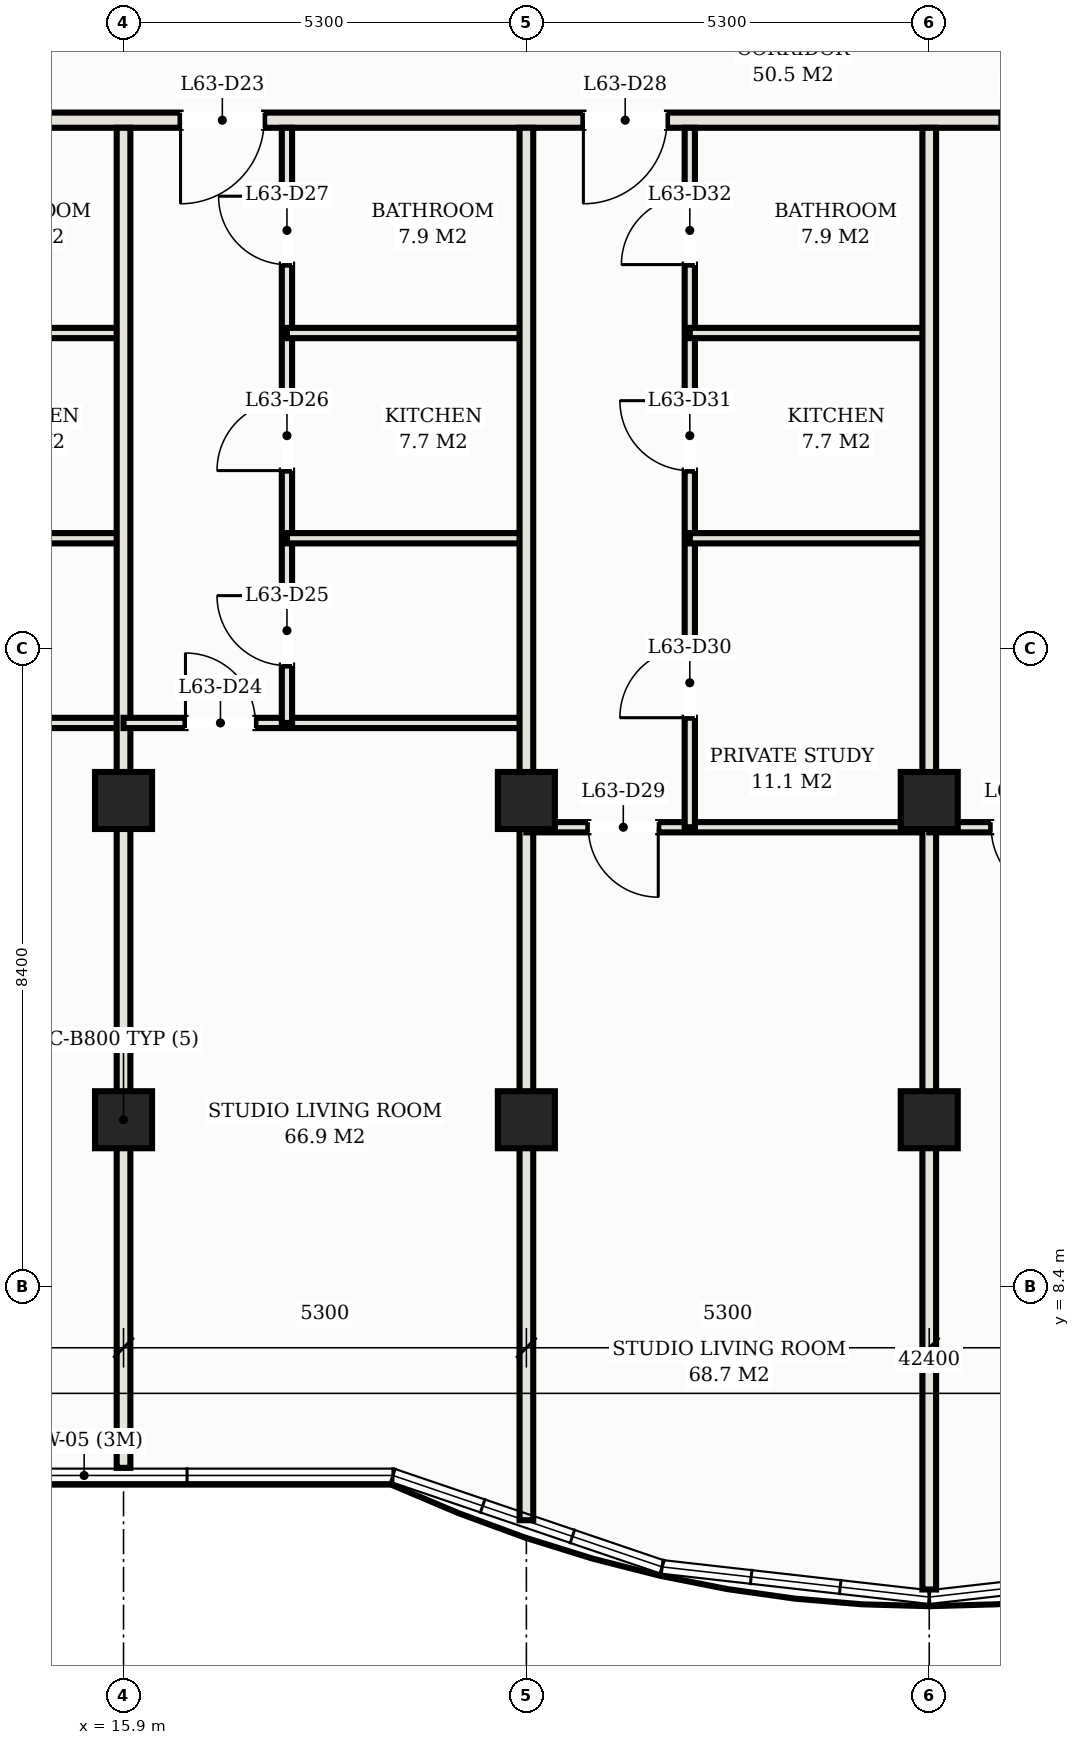
"""IFC4 building model, lengths in metres.
Left out: names, types, materials, properties, quantities, classifications, styles, units other than length and angle.
Written with IfcOpenShell. Run it as: python <this file> out.ifc"""

import sys

from ifc_helpers import new_model, si_unit, direction, frame, frame_2d, origin, origin_2d, place, context, subcontext, project, spatial, rectangle, hollow_rectangle, extrude, element, fill, save


model = new_model("IFC4")
c1 = context("Model", 3, precision=1e-05, world=origin(), true_north=direction((0.0, 1.0)))
c2 = subcontext(c1, "Body", "Model", "MODEL_VIEW")
j1 = project(units=[si_unit("LENGTHUNIT", "METRE"), si_unit("PLANEANGLEUNIT", "RADIAN")], contexts=[c1])
p1 = place(None, origin())
s1 = spatial("IfcSite", under=j1, at=p1, CompositionType="ELEMENT")
p2 = place(p1, origin())
s2 = spatial("IfcBuilding", under=s1, at=p2, CompositionType="ELEMENT")
p3 = place(p2, frame((0.0, 0.0, 229.7)))
s3 = spatial("IfcBuildingStorey", under=s2, at=p3, CompositionType="ELEMENT", Elevation=229.7)
for number, where, z_axis, x_axis in (
    (1, (15.9, 14.8, 0.0), (0.0, 0.0, 1.0), (1.0, 0.0, 0.0)),
    (2, (15.9, 10.6, 0.0), (0.0, 0.0, 1.0), (1.0, 0.0, 0.0)),
    (3, (21.2, 14.8, 0.0), (0.0, 0.0, 1.0), (1.0, 0.0, 0.0)),
    (4, (21.2, 10.6, 0.0), (0.0, 0.0, 1.0), (1.0, 0.0, 0.0)),
    (5, (26.5, 14.8, 0.0), (0.0, 0.0, 1.0), (1.0, 0.0, 0.0)),
    (6, (26.5, 10.6, 0.0), (0.0, 0.0, 1.0), (1.0, 0.0, 0.0)),
):
    element("IfcColumn", number, at=place(p3, frame(where, z_axis=z_axis, x_axis=x_axis)), inside=s3, PredefinedType="COLUMN", context=c2, shape_type="SweptSolid", body=[
        extrude(hollow_rectangle(XDim=0.75, YDim=0.75, WallThickness=0.025, at=origin_2d()), origin(), (0.0, 0.0, 1.0), 3.3),
    ])
p4 = place(p3, frame((6.72, 23.75, 0.0), z_axis=(0.0, 0.0, 1.0), x_axis=(1.0, 0.0, 0.0)))
e7 = element("IfcWall", 7, at=p4, inside=s3, PredefinedType="PARTITIONING", context=c2, shape_type="SweptSolid", body=[
    extrude(rectangle(XDim=39.56, YDim=0.2, at=frame_2d((19.78, 0.0))), origin(), (0.0, 0.0, 1.0), 2.43),
])
p5 = place(p4, frame((4.63, 0.0, 0.0)))
e8 = element("IfcOpeningElement", 8, at=p5, cuts=e7, PredefinedType="OPENING", context=c2, shape_type="SweptSolid", body=[
    extrude(rectangle(XDim=1.1, YDim=2.25, at=frame_2d((0.55, 1.125))), frame((0.0, 0.11, 0.0), z_axis=(0.0, -1.0, 0.0), x_axis=(1.0, 0.0, 0.0)), (0.0, 0.0, 1.0), 0.22),
])
p6 = place(p4, frame((9.93, 0.0, 0.0)))
e9 = element("IfcOpeningElement", 9, at=p6, cuts=e7, PredefinedType="OPENING", context=c2, shape_type="SweptSolid", body=[
    extrude(rectangle(XDim=1.1, YDim=2.25, at=frame_2d((0.55, 1.125))), frame((0.0, 0.11, 0.0), z_axis=(0.0, -1.0, 0.0), x_axis=(1.0, 0.0, 0.0)), (0.0, 0.0, 1.0), 0.22),
])
p7 = place(p4, frame((15.23, 0.0, 0.0)))
e10 = element("IfcOpeningElement", 10, at=p7, cuts=e7, PredefinedType="OPENING", context=c2, shape_type="SweptSolid", body=[
    extrude(rectangle(XDim=1.1, YDim=2.25, at=frame_2d((0.55, 1.125))), frame((0.0, 0.11, 0.0), z_axis=(0.0, -1.0, 0.0), x_axis=(1.0, 0.0, 0.0)), (0.0, 0.0, 1.0), 0.22),
])
p8 = place(p4, frame((20.73, 0.0, 0.0)))
e11 = element("IfcOpeningElement", 11, at=p8, cuts=e7, PredefinedType="OPENING", context=c2, shape_type="SweptSolid", body=[
    extrude(rectangle(XDim=1.1, YDim=2.25, at=frame_2d((0.55, 1.125))), frame((0.0, 0.11, 0.0), z_axis=(0.0, -1.0, 0.0), x_axis=(1.0, 0.0, 0.0)), (0.0, 0.0, 1.0), 0.22),
])
p9 = place(p4, frame((25.83, 0.0, 0.0)))
e12 = element("IfcOpeningElement", 12, at=p9, cuts=e7, PredefinedType="OPENING", context=c2, shape_type="SweptSolid", body=[
    extrude(rectangle(XDim=1.1, YDim=2.25, at=frame_2d((0.55, 1.125))), frame((0.0, 0.11, 0.0), z_axis=(0.0, -1.0, 0.0), x_axis=(1.0, 0.0, 0.0)), (0.0, 0.0, 1.0), 0.22),
])
p10 = place(p4, frame((31.13, 0.0, 0.0)))
e13 = element("IfcOpeningElement", 13, at=p10, cuts=e7, PredefinedType="OPENING", context=c2, shape_type="SweptSolid", body=[
    extrude(rectangle(XDim=1.1, YDim=2.25, at=frame_2d((0.55, 1.125))), frame((0.0, 0.11, 0.0), z_axis=(0.0, -1.0, 0.0), x_axis=(1.0, 0.0, 0.0)), (0.0, 0.0, 1.0), 0.22),
])
p11 = place(p4, frame((2.085, 0.0, 0.0)))
e14 = element("IfcOpeningElement", 14, at=p11, cuts=e7, PredefinedType="OPENING", context=c2, shape_type="SweptSolid", body=[
    extrude(rectangle(XDim=0.92, YDim=2.15, at=frame_2d((0.46, 1.075))), frame((0.0, 0.11, 0.0), z_axis=(0.0, -1.0, 0.0), x_axis=(1.0, 0.0, 0.0)), (0.0, 0.0, 1.0), 0.22),
])
p12 = place(p4, frame((36.555, 0.0, 0.0)))
e15 = element("IfcOpeningElement", 15, at=p12, cuts=e7, PredefinedType="OPENING", context=c2, shape_type="SweptSolid", body=[
    extrude(rectangle(XDim=0.92, YDim=2.15, at=frame_2d((0.46, 1.075))), frame((0.0, 0.11, 0.0), z_axis=(0.0, -1.0, 0.0), x_axis=(1.0, 0.0, 0.0)), (0.0, 0.0, 1.0), 0.22),
])
p13 = place(p3, frame((10.6, 15.82, 0.0), z_axis=(0.0, 0.0, 1.0), x_axis=(1.0, 0.0, 0.0)))
e16 = element("IfcWall", 16, at=p13, inside=s3, PredefinedType="PARTITIONING", context=c2, shape_type="SweptSolid", body=[
    extrude(rectangle(XDim=5.3, YDim=0.135, at=frame_2d((2.65, 0.0))), origin(), (0.0, 0.0, 1.0), 2.43),
])
p14 = place(p13, frame((0.815, 0.0, 0.0)))
e17 = element("IfcOpeningElement", 17, at=p14, cuts=e16, PredefinedType="OPENING", context=c2, shape_type="SweptSolid", body=[
    extrude(rectangle(XDim=0.92, YDim=2.15, at=frame_2d((0.46, 1.075))), frame((0.0, 0.078, 0.0), z_axis=(0.0, -1.0, 0.0), x_axis=(1.0, 0.0, 0.0)), (0.0, 0.0, 1.0), 0.155),
])
for number, where, z_axis, x_axis in (
    (18, (12.75, 18.25, 0.0), (0.0, 0.0, 1.0), (1.0, 0.0, 0.0)),
    (19, (12.75, 20.95, 0.0), (0.0, 0.0, 1.0), (1.0, 0.0, 0.0)),
):
    element("IfcWall", number, at=place(p3, frame(where, z_axis=z_axis, x_axis=x_axis)), inside=s3, PredefinedType="PARTITIONING", context=c2, shape_type="SweptSolid", body=[
        extrude(rectangle(XDim=3.15, YDim=0.135, at=frame_2d((1.575, 0.0))), origin(), (0.0, 0.0, 1.0), 2.43),
    ])
p15 = place(p3, frame((15.9, 6.02, 0.0), z_axis=(0.0, 0.0, 1.0), x_axis=(0.0, 1.0, 0.0)))
e20 = element("IfcWall", 20, at=p15, inside=s3, PredefinedType="PARTITIONING", context=c2, shape_type="SweptSolid", body=[
    extrude(rectangle(XDim=17.63, YDim=0.18, at=frame_2d((8.815, 0.0))), origin(), (0.0, 0.0, 1.0), 2.43),
])
p16 = place(p3, frame((15.9, 15.82, 0.0), z_axis=(0.0, 0.0, 1.0), x_axis=(1.0, 0.0, 0.0)))
e21 = element("IfcWall", 21, at=p16, inside=s3, PredefinedType="PARTITIONING", context=c2, shape_type="SweptSolid", body=[
    extrude(rectangle(XDim=5.3, YDim=0.135, at=frame_2d((2.65, 0.0))), origin(), (0.0, 0.0, 1.0), 2.43),
])
p17 = place(p16, frame((0.815, 0.0, 0.0)))
e22 = element("IfcOpeningElement", 22, at=p17, cuts=e21, PredefinedType="OPENING", context=c2, shape_type="SweptSolid", body=[
    extrude(rectangle(XDim=0.92, YDim=2.15, at=frame_2d((0.46, 1.075))), frame((0.0, 0.078, 0.0), z_axis=(0.0, -1.0, 0.0), x_axis=(1.0, 0.0, 0.0)), (0.0, 0.0, 1.0), 0.155),
])
p18 = place(p3, frame((18.05, 15.82, 0.0), z_axis=(0.0, 0.0, 1.0), x_axis=(0.0, 1.0, 0.0)))
e23 = element("IfcWall", 23, at=p18, inside=s3, PredefinedType="PARTITIONING", context=c2, shape_type="SweptSolid", body=[
    extrude(rectangle(XDim=7.83, YDim=0.135, at=frame_2d((3.915, 0.0))), origin(), (0.0, 0.0, 1.0), 2.43),
])
p19 = place(p18, frame((0.755, 0.0, 0.0)))
e24 = element("IfcOpeningElement", 24, at=p19, cuts=e23, PredefinedType="OPENING", context=c2, shape_type="SweptSolid", body=[
    extrude(rectangle(XDim=0.92, YDim=2.15, at=frame_2d((0.46, 1.075))), frame((0.0, 0.078, 0.0), z_axis=(0.0, -1.0, 0.0), x_axis=(1.0, 0.0, 0.0)), (0.0, 0.0, 1.0), 0.155),
])
p20 = place(p18, frame((3.32, 0.0, 0.0)))
e25 = element("IfcOpeningElement", 25, at=p20, cuts=e23, PredefinedType="OPENING", context=c2, shape_type="SweptSolid", body=[
    extrude(rectangle(XDim=0.92, YDim=2.15, at=frame_2d((0.46, 1.075))), frame((0.0, 0.078, 0.0), z_axis=(0.0, -1.0, 0.0), x_axis=(1.0, 0.0, 0.0)), (0.0, 0.0, 1.0), 0.155),
])
p21 = place(p18, frame((6.03, 0.0, 0.0)))
e26 = element("IfcOpeningElement", 26, at=p21, cuts=e23, PredefinedType="OPENING", context=c2, shape_type="SweptSolid", body=[
    extrude(rectangle(XDim=0.9, YDim=2.15, at=frame_2d((0.45, 1.075))), frame((0.0, 0.078, 0.0), z_axis=(0.0, -1.0, 0.0), x_axis=(1.0, 0.0, 0.0)), (0.0, 0.0, 1.0), 0.155),
])
for number, where, z_axis, x_axis in (
    (27, (18.05, 18.25, 0.0), (0.0, 0.0, 1.0), (1.0, 0.0, 0.0)),
    (28, (18.05, 20.95, 0.0), (0.0, 0.0, 1.0), (1.0, 0.0, 0.0)),
):
    element("IfcWall", number, at=place(p3, frame(where, z_axis=z_axis, x_axis=x_axis)), inside=s3, PredefinedType="PARTITIONING", context=c2, shape_type="SweptSolid", body=[
        extrude(rectangle(XDim=3.15, YDim=0.135, at=frame_2d((1.575, 0.0))), origin(), (0.0, 0.0, 1.0), 2.43),
    ])
p22 = place(p3, frame((21.2, 5.331, 0.0), z_axis=(0.0, 0.0, 1.0), x_axis=(0.0, 1.0, 0.0)))
e29 = element("IfcWall", 29, at=p22, inside=s3, PredefinedType="PARTITIONING", context=c2, shape_type="SweptSolid", body=[
    extrude(rectangle(XDim=18.319, YDim=0.18, at=frame_2d((9.159, 0.0))), origin(), (0.0, 0.0, 1.0), 2.43),
])
p23 = place(p3, frame((21.2, 14.448, 0.0), z_axis=(0.0, 0.0, 1.0), x_axis=(1.0, 0.0, 0.0)))
e30 = element("IfcWall", 30, at=p23, inside=s3, PredefinedType="PARTITIONING", context=c2, shape_type="SweptSolid", body=[
    extrude(rectangle(XDim=5.3, YDim=0.135, at=frame_2d((2.65, 0.0))), origin(), (0.0, 0.0, 1.0), 2.43),
])
p24 = place(p23, frame((0.815, 0.0, 0.0)))
e31 = element("IfcOpeningElement", 31, at=p24, cuts=e30, PredefinedType="OPENING", context=c2, shape_type="SweptSolid", body=[
    extrude(rectangle(XDim=0.92, YDim=2.15, at=frame_2d((0.46, 1.075))), frame((0.0, 0.078, 0.0), z_axis=(0.0, -1.0, 0.0), x_axis=(1.0, 0.0, 0.0)), (0.0, 0.0, 1.0), 0.155),
])
p25 = place(p3, frame((23.35, 14.448, 0.0), z_axis=(0.0, 0.0, 1.0), x_axis=(0.0, 1.0, 0.0)))
e32 = element("IfcWall", 32, at=p25, inside=s3, PredefinedType="PARTITIONING", context=c2, shape_type="SweptSolid", body=[
    extrude(rectangle(XDim=9.202, YDim=0.135, at=frame_2d((4.601, 0.0))), origin(), (0.0, 0.0, 1.0), 2.43),
])
p26 = place(p25, frame((1.441, 0.0, 0.0)))
e33 = element("IfcOpeningElement", 33, at=p26, cuts=e32, PredefinedType="OPENING", context=c2, shape_type="SweptSolid", body=[
    extrude(rectangle(XDim=0.92, YDim=2.15, at=frame_2d((0.46, 1.075))), frame((0.0, 0.078, 0.0), z_axis=(0.0, -1.0, 0.0), x_axis=(1.0, 0.0, 0.0)), (0.0, 0.0, 1.0), 0.155),
])
p27 = place(p25, frame((4.692, 0.0, 0.0)))
e34 = element("IfcOpeningElement", 34, at=p27, cuts=e32, PredefinedType="OPENING", context=c2, shape_type="SweptSolid", body=[
    extrude(rectangle(XDim=0.92, YDim=2.15, at=frame_2d((0.46, 1.075))), frame((0.0, 0.078, 0.0), z_axis=(0.0, -1.0, 0.0), x_axis=(1.0, 0.0, 0.0)), (0.0, 0.0, 1.0), 0.155),
])
p28 = place(p25, frame((7.402, 0.0, 0.0)))
e35 = element("IfcOpeningElement", 35, at=p28, cuts=e32, PredefinedType="OPENING", context=c2, shape_type="SweptSolid", body=[
    extrude(rectangle(XDim=0.9, YDim=2.15, at=frame_2d((0.45, 1.075))), frame((0.0, 0.078, 0.0), z_axis=(0.0, -1.0, 0.0), x_axis=(1.0, 0.0, 0.0)), (0.0, 0.0, 1.0), 0.155),
])
for number, where, z_axis, x_axis in (
    (36, (23.35, 18.25, 0.0), (0.0, 0.0, 1.0), (1.0, 0.0, 0.0)),
    (37, (23.35, 20.95, 0.0), (0.0, 0.0, 1.0), (1.0, 0.0, 0.0)),
):
    element("IfcWall", number, at=place(p3, frame(where, z_axis=z_axis, x_axis=x_axis)), inside=s3, PredefinedType="PARTITIONING", context=c2, shape_type="SweptSolid", body=[
        extrude(rectangle(XDim=3.15, YDim=0.135, at=frame_2d((1.575, 0.0))), origin(), (0.0, 0.0, 1.0), 2.43),
    ])
p29 = place(p3, frame((26.5, 4.42, 0.0), z_axis=(0.0, 0.0, 1.0), x_axis=(0.0, 1.0, 0.0)))
e38 = element("IfcWall", 38, at=p29, inside=s3, PredefinedType="PARTITIONING", context=c2, shape_type="SweptSolid", body=[
    extrude(rectangle(XDim=19.23, YDim=0.18, at=frame_2d((9.615, 0.0))), origin(), (0.0, 0.0, 1.0), 2.43),
])
p30 = place(p3, frame((26.5, 14.448, 0.0), z_axis=(0.0, 0.0, 1.0), x_axis=(1.0, 0.0, 0.0)))
e39 = element("IfcWall", 39, at=p30, inside=s3, PredefinedType="PARTITIONING", context=c2, shape_type="SweptSolid", body=[
    extrude(rectangle(XDim=5.3, YDim=0.135, at=frame_2d((2.65, 0.0))), origin(), (0.0, 0.0, 1.0), 2.43),
])
p31 = place(p30, frame((0.815, 0.0, 0.0)))
e40 = element("IfcOpeningElement", 40, at=p31, cuts=e39, PredefinedType="OPENING", context=c2, shape_type="SweptSolid", body=[
    extrude(rectangle(XDim=0.92, YDim=2.15, at=frame_2d((0.46, 1.075))), frame((0.0, 0.078, 0.0), z_axis=(0.0, -1.0, 0.0), x_axis=(1.0, 0.0, 0.0)), (0.0, 0.0, 1.0), 0.155),
])
p32 = place(p6, frame((1.1, 0.0, 0.0), z_axis=(0.0, 0.0, 1.0), x_axis=(-1.0, 0.0, 0.0)))
e41 = element("IfcDoor", 41, at=p32, inside=s3, OperationType="SINGLE_SWING_RIGHT", PredefinedType="DOOR", context=c2, shape_type="SweptSolid", body=[
    extrude(rectangle(XDim=1.1, YDim=2.25, at=frame_2d((0.55, 1.125))), frame((0.0, 0.025, 0.0), z_axis=(0.0, -1.0, 0.0), x_axis=(1.0, 0.0, 0.0)), (0.0, 0.0, 1.0), 0.05),
])
fill(e9, e41)
p33 = place(p17, origin())
e42 = element("IfcDoor", 42, at=p33, inside=s3, OperationType="SINGLE_SWING_LEFT", PredefinedType="DOOR", context=c2, shape_type="SweptSolid", body=[
    extrude(rectangle(XDim=0.92, YDim=2.15, at=frame_2d((0.46, 1.075))), frame((0.0, 0.025, 0.0), z_axis=(0.0, -1.0, 0.0), x_axis=(1.0, 0.0, 0.0)), (0.0, 0.0, 1.0), 0.05),
])
fill(e22, e42)
p34 = place(p19, origin())
e43 = element("IfcDoor", 43, at=p34, inside=s3, OperationType="SINGLE_SWING_RIGHT", PredefinedType="DOOR", context=c2, shape_type="SweptSolid", body=[
    extrude(rectangle(XDim=0.92, YDim=2.15, at=frame_2d((0.46, 1.075))), frame((0.0, 0.025, 0.0), z_axis=(0.0, -1.0, 0.0), x_axis=(1.0, 0.0, 0.0)), (0.0, 0.0, 1.0), 0.05),
])
fill(e24, e43)
p35 = place(p20, origin())
e44 = element("IfcDoor", 44, at=p35, inside=s3, OperationType="SINGLE_SWING_LEFT", PredefinedType="DOOR", context=c2, shape_type="SweptSolid", body=[
    extrude(rectangle(XDim=0.92, YDim=2.15, at=frame_2d((0.46, 1.075))), frame((0.0, 0.025, 0.0), z_axis=(0.0, -1.0, 0.0), x_axis=(1.0, 0.0, 0.0)), (0.0, 0.0, 1.0), 0.05),
])
fill(e25, e44)
p36 = place(p21, origin())
e45 = element("IfcDoor", 45, at=p36, inside=s3, OperationType="SINGLE_SWING_RIGHT", PredefinedType="DOOR", context=c2, shape_type="SweptSolid", body=[
    extrude(rectangle(XDim=0.9, YDim=2.15, at=frame_2d((0.45, 1.075))), frame((0.0, 0.025, 0.0), z_axis=(0.0, -1.0, 0.0), x_axis=(1.0, 0.0, 0.0)), (0.0, 0.0, 1.0), 0.05),
])
fill(e26, e45)
p37 = place(p7, frame((1.1, 0.0, 0.0), z_axis=(0.0, 0.0, 1.0), x_axis=(-1.0, 0.0, 0.0)))
e46 = element("IfcDoor", 46, at=p37, inside=s3, OperationType="SINGLE_SWING_RIGHT", PredefinedType="DOOR", context=c2, shape_type="SweptSolid", body=[
    extrude(rectangle(XDim=1.1, YDim=2.25, at=frame_2d((0.55, 1.125))), frame((0.0, 0.025, 0.0), z_axis=(0.0, -1.0, 0.0), x_axis=(1.0, 0.0, 0.0)), (0.0, 0.0, 1.0), 0.05),
])
fill(e10, e46)
p38 = place(p24, frame((0.92, 0.0, 0.0), z_axis=(0.0, 0.0, 1.0), x_axis=(-1.0, 0.0, 0.0)))
e47 = element("IfcDoor", 47, at=p38, inside=s3, OperationType="SINGLE_SWING_LEFT", PredefinedType="DOOR", context=c2, shape_type="SweptSolid", body=[
    extrude(rectangle(XDim=0.92, YDim=2.15, at=frame_2d((0.46, 1.075))), frame((0.0, 0.025, 0.0), z_axis=(0.0, -1.0, 0.0), x_axis=(1.0, 0.0, 0.0)), (0.0, 0.0, 1.0), 0.05),
])
fill(e31, e47)
p39 = place(p26, origin())
e48 = element("IfcDoor", 48, at=p39, inside=s3, OperationType="SINGLE_SWING_LEFT", PredefinedType="DOOR", context=c2, shape_type="SweptSolid", body=[
    extrude(rectangle(XDim=0.92, YDim=2.15, at=frame_2d((0.46, 1.075))), frame((0.0, 0.025, 0.0), z_axis=(0.0, -1.0, 0.0), x_axis=(1.0, 0.0, 0.0)), (0.0, 0.0, 1.0), 0.05),
])
fill(e33, e48)
p40 = place(p27, origin())
e49 = element("IfcDoor", 49, at=p40, inside=s3, OperationType="SINGLE_SWING_RIGHT", PredefinedType="DOOR", context=c2, shape_type="SweptSolid", body=[
    extrude(rectangle(XDim=0.92, YDim=2.15, at=frame_2d((0.46, 1.075))), frame((0.0, 0.025, 0.0), z_axis=(0.0, -1.0, 0.0), x_axis=(1.0, 0.0, 0.0)), (0.0, 0.0, 1.0), 0.05),
])
fill(e34, e49)
p41 = place(p28, origin())
e50 = element("IfcDoor", 50, at=p41, inside=s3, OperationType="SINGLE_SWING_LEFT", PredefinedType="DOOR", context=c2, shape_type="SweptSolid", body=[
    extrude(rectangle(XDim=0.9, YDim=2.15, at=frame_2d((0.45, 1.075))), frame((0.0, 0.025, 0.0), z_axis=(0.0, -1.0, 0.0), x_axis=(1.0, 0.0, 0.0)), (0.0, 0.0, 1.0), 0.05),
])
fill(e35, e50)
p42 = place(p31, frame((0.92, 0.0, 0.0), z_axis=(0.0, 0.0, 1.0), x_axis=(-1.0, 0.0, 0.0)))
e51 = element("IfcDoor", 51, at=p42, inside=s3, OperationType="SINGLE_SWING_LEFT", PredefinedType="DOOR", context=c2, shape_type="SweptSolid", body=[
    extrude(rectangle(XDim=0.92, YDim=2.15, at=frame_2d((0.46, 1.075))), frame((0.0, 0.025, 0.0), z_axis=(0.0, -1.0, 0.0), x_axis=(1.0, 0.0, 0.0)), (0.0, 0.0, 1.0), 0.05),
])
fill(e40, e51)
save(model, sys.argv[1])
